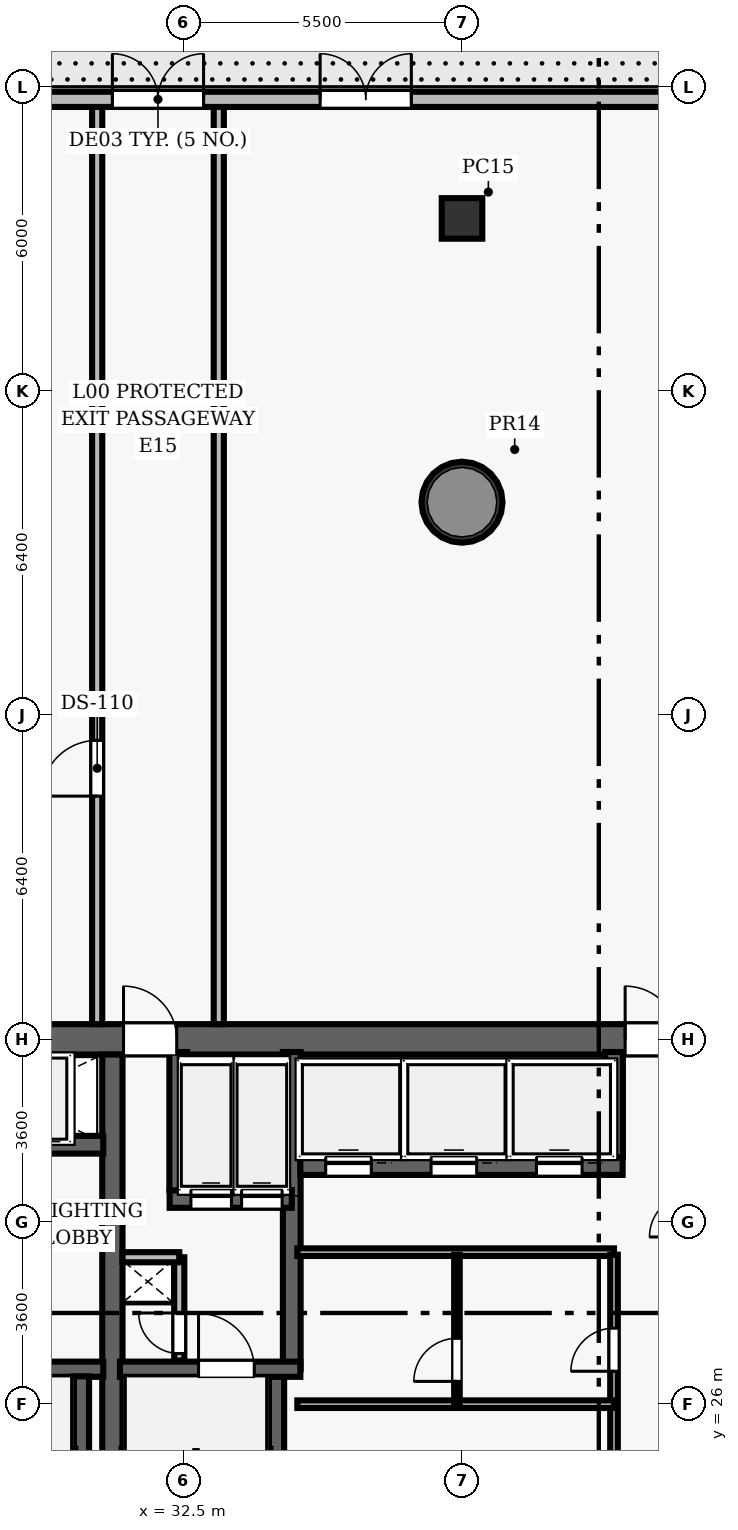
"""IFC4 building model, lengths in metres.
Left out: names, types, materials, properties, quantities, classifications, styles, units other than length and angle.
Written with IfcOpenShell. Run it as: python <this file> out.ifc"""

import sys

from ifc_helpers import new_model, si_unit, direction, frame, frame_2d, origin, origin_2d, place, context, subcontext, project, spatial, rectangle, hollow_circle, extrude, element, fill, save


model = new_model("IFC4")
c1 = context("Model", 3, precision=1e-05, world=origin(), true_north=direction((0.0, 1.0)))
c2 = subcontext(c1, "Body", "Model", "MODEL_VIEW")
j1 = project(units=[si_unit("LENGTHUNIT", "METRE"), si_unit("PLANEANGLEUNIT", "RADIAN")], contexts=[c1])
p1 = place(None, origin())
s1 = spatial("IfcSite", under=j1, at=p1, CompositionType="ELEMENT")
p2 = place(p1, origin())
s2 = spatial("IfcBuilding", under=s1, at=p2, CompositionType="ELEMENT")
p3 = place(p2, origin())
s3 = spatial("IfcBuildingStorey", under=s2, at=p3, CompositionType="ELEMENT", Elevation=0.0)
p4 = place(p3, frame((26.7, 33.2, 0.0), z_axis=(0.0, 0.0, 1.0), x_axis=(1.0, 0.0, 0.0)))
e1 = element("IfcWall", 1, at=p4, inside=s3, PredefinedType="SHEAR", context=c2, shape_type="SweptSolid", body=[
    extrude(rectangle(XDim=22.6, YDim=0.6, at=frame_2d((11.3, 0.0))), origin(), (0.0, 0.0, 1.0), 6.6),
])
p5 = place(p4, frame((4.62, 0.0, 0.0)))
e2 = element("IfcOpeningElement", 2, at=p5, cuts=e1, PredefinedType="OPENING", context=c2, shape_type="SweptSolid", body=[
    extrude(rectangle(XDim=1.05, YDim=2.15, at=frame_2d((0.525, 1.075))), frame((0.0, 0.31, 0.0), z_axis=(0.0, -1.0, 0.0), x_axis=(1.0, 0.0, 0.0)), (0.0, 0.0, 1.0), 0.62),
])
p6 = place(p4, frame((14.52, 0.0, 0.0)))
e3 = element("IfcOpeningElement", 3, at=p6, cuts=e1, PredefinedType="OPENING", context=c2, shape_type="SweptSolid", body=[
    extrude(rectangle(XDim=1.05, YDim=2.15, at=frame_2d((0.525, 1.075))), frame((0.0, 0.31, 0.0), z_axis=(0.0, -1.0, 0.0), x_axis=(1.0, 0.0, 0.0)), (0.0, 0.0, 1.0), 0.62),
])
p7 = place(p3, frame((31.1, 19.1, 0.0), z_axis=(0.0, 0.0, 1.0), x_axis=(0.0, 1.0, 0.0)))
e4 = element("IfcWall", 4, at=p7, inside=s3, PredefinedType="SHEAR", context=c2, shape_type="SweptSolid", body=[
    extrude(rectangle(XDim=13.8, YDim=0.4, at=frame_2d((6.9, 0.0))), origin(), (0.0, 0.0, 1.0), 6.6),
])
p8 = place(p3, frame((38.0, 49.4, 0.0), z_axis=(0.0, 0.0, 1.0), x_axis=(1.0, 0.0, 0.0)))
e5 = element("IfcColumn", 5, at=p8, inside=s3, PredefinedType="COLUMN", context=c2, shape_type="SweptSolid", body=[
    extrude(rectangle(XDim=0.8, YDim=0.8, at=origin_2d()), origin(), (0.0, 0.0, 1.0), 6.6),
])
p9 = place(p3, frame((38.0, 43.8, 0.0), z_axis=(0.0, 0.0, 1.0), x_axis=(1.0, 0.0, 0.0)))
e6 = element("IfcColumn", 6, at=p9, inside=s3, PredefinedType="COLUMN", context=c2, shape_type="SweptSolid", body=[
    extrude(hollow_circle(Radius=0.8, WallThickness=0.06, at=origin_2d()), origin(), (0.0, 0.0, 1.0), 6.6),
])
p10 = place(p3, frame((27.25, 26.69, 0.0), z_axis=(0.0, 0.0, 1.0), x_axis=(1.0, 0.0, 0.0)))
e7 = element("IfcWall", 7, at=p10, inside=s3, PredefinedType="SHEAR", context=c2, shape_type="SweptSolid", body=[
    extrude(rectangle(XDim=3.67, YDim=0.3, at=frame_2d((1.835, 0.0))), origin(), (0.0, 0.0, 1.0), 6.6),
])
p11 = place(p10, frame((1.05, 0.0, 0.0)))
e8 = element("IfcOpeningElement", 8, at=p11, cuts=e7, PredefinedType="OPENING", context=c2, shape_type="SweptSolid", body=[
    extrude(rectangle(XDim=1.1, YDim=2.15, at=frame_2d((0.55, 1.075))), frame((0.0, 0.16, 0.0), z_axis=(0.0, -1.0, 0.0), x_axis=(1.0, 0.0, 0.0)), (0.0, 0.0, 1.0), 0.32),
])
p12 = place(p3, frame((30.49, 19.05, 0.0), z_axis=(0.0, 0.0, 1.0), x_axis=(0.0, 1.0, 0.0)))
e9 = element("IfcWall", 9, at=p12, inside=s3, PredefinedType="SHEAR", context=c2, shape_type="SweptSolid", body=[
    extrude(rectangle(XDim=7.5, YDim=0.3, at=frame_2d((3.75, 0.0))), origin(), (0.0, 0.0, 1.0), 6.6),
])
p13 = place(p3, frame((27.25, 31.12, 0.0), z_axis=(0.0, 0.0, 1.0), x_axis=(1.0, 0.0, 0.0)))
e10 = element("IfcWall", 10, at=p13, inside=s3, PredefinedType="SHEAR", context=c2, shape_type="SweptSolid", body=[
    extrude(rectangle(XDim=3.67, YDim=0.35, at=frame_2d((1.835, 0.0))), origin(), (0.0, 0.0, 1.0), 5.31),
])
p14 = place(p13, frame((1.25, 0.0, 0.0)))
e11 = element("IfcOpeningElement", 11, at=p14, cuts=e10, PredefinedType="OPENING", context=c2, shape_type="SweptSolid", body=[
    extrude(rectangle(XDim=1.1, YDim=2.15, at=frame_2d((0.55, 1.075))), frame((0.0, 0.185, 0.0), z_axis=(0.0, -1.0, 0.0), x_axis=(1.0, 0.0, 0.0)), (0.0, 0.0, 1.0), 0.37),
])
p15 = place(p3, frame((34.34, 19.05, 0.0), z_axis=(0.0, 0.0, 1.0), x_axis=(0.0, 1.0, 0.0)))
e12 = element("IfcWall", 12, at=p15, inside=s3, PredefinedType="SHEAR", context=c2, shape_type="SweptSolid", body=[
    extrude(rectangle(XDim=7.5, YDim=0.3, at=frame_2d((3.75, 0.0))), origin(), (0.0, 0.0, 1.0), 6.6),
])
p16 = place(p3, frame((34.64, 26.69, 0.0), z_axis=(0.0, 0.0, 1.0), x_axis=(0.0, 1.0, 0.0)))
e13 = element("IfcWall", 13, at=p16, inside=s3, PredefinedType="SHEAR", context=c2, shape_type="SweptSolid", body=[
    extrude(rectangle(XDim=6.26, YDim=0.35, at=frame_2d((3.13, 0.0))), origin(), (0.0, 0.0, 1.0), 6.6),
])
p17 = place(p3, frame((31.25, 26.69, 0.0), z_axis=(0.0, 0.0, 1.0), x_axis=(1.0, 0.0, 0.0)))
e14 = element("IfcWall", 14, at=p17, inside=s3, PredefinedType="SHEAR", context=c2, shape_type="SweptSolid", body=[
    extrude(rectangle(XDim=3.56, YDim=0.3, at=frame_2d((1.78, 0.0))), origin(), (0.0, 0.0, 1.0), 6.6),
])
p18 = place(p17, frame((1.55, 0.0, 0.0)))
e15 = element("IfcOpeningElement", 15, at=p18, cuts=e14, PredefinedType="OPENING", context=c2, shape_type="SweptSolid", body=[
    extrude(rectangle(XDim=1.1, YDim=2.15, at=frame_2d((0.55, 1.075))), frame((0.0, 0.16, 0.0), z_axis=(0.0, -1.0, 0.0), x_axis=(1.0, 0.0, 0.0)), (0.0, 0.0, 1.0), 0.32),
])
p19 = place(p3, frame((32.23, 30.05, 0.0), z_axis=(0.0, 0.0, 1.0), x_axis=(1.0, 0.0, 0.0)))
e16 = element("IfcWall", 16, at=p19, inside=s3, PredefinedType="SHEAR", context=c2, shape_type="SweptSolid", body=[
    extrude(rectangle(XDim=2.41, YDim=0.35, at=frame_2d((1.205, 0.0))), origin(), (0.0, 0.0, 1.0), 5.31),
])
p20 = place(p19, frame((0.42, 0.0, 0.0)))
e17 = element("IfcOpeningElement", 17, at=p20, cuts=e16, PredefinedType="OPENING", context=c2, shape_type="SweptSolid", body=[
    extrude(rectangle(XDim=0.8, YDim=2.15, at=frame_2d((0.4, 1.075))), frame((0.0, 0.185, 0.0), z_axis=(0.0, -1.0, 0.0), x_axis=(1.0, 0.0, 0.0)), (0.0, 0.0, 1.0), 0.37),
])
p21 = place(p19, frame((1.42, 0.0, 0.0)))
e18 = element("IfcOpeningElement", 18, at=p21, cuts=e16, PredefinedType="OPENING", context=c2, shape_type="SweptSolid", body=[
    extrude(rectangle(XDim=0.8, YDim=2.15, at=frame_2d((0.4, 1.075))), frame((0.0, 0.185, 0.0), z_axis=(0.0, -1.0, 0.0), x_axis=(1.0, 0.0, 0.0)), (0.0, 0.0, 1.0), 0.37),
])
p22 = place(p3, frame((32.4, 30.22, 0.0), z_axis=(0.0, 0.0, 1.0), x_axis=(0.0, 1.0, 0.0)))
e19 = element("IfcWall", 19, at=p22, inside=s3, PredefinedType="SHEAR", context=c2, shape_type="SweptSolid", body=[
    extrude(rectangle(XDim=2.73, YDim=0.35, at=frame_2d((1.365, 0.0))), origin(), (0.0, 0.0, 1.0), 5.31),
])
p23 = place(p3, frame((32.42, 26.86, 0.0), z_axis=(0.0, 0.0, 1.0), x_axis=(0.0, 1.0, 0.0)))
e20 = element("IfcWall", 20, at=p23, inside=s3, PredefinedType="PARTITIONING", context=c2, shape_type="SweptSolid", body=[
    extrude(rectangle(XDim=2.04, YDim=0.2, at=frame_2d((1.02, 0.0))), origin(), (0.0, 0.0, 1.0), 5.31),
])
p24 = place(p23, frame((0.14, 0.0, 0.0)))
e21 = element("IfcOpeningElement", 21, at=p24, cuts=e20, PredefinedType="OPENING", context=c2, shape_type="SweptSolid", body=[
    extrude(rectangle(XDim=0.8, YDim=2.05, at=frame_2d((0.4, 1.025))), frame((0.0, 0.11, 0.0), z_axis=(0.0, -1.0, 0.0), x_axis=(1.0, 0.0, 0.0)), (0.0, 0.0, 1.0), 0.22),
])
p25 = place(p3, frame((31.3, 28.9, 0.0), z_axis=(0.0, 0.0, 1.0), x_axis=(1.0, 0.0, 0.0)))
e22 = element("IfcWall", 22, at=p25, inside=s3, PredefinedType="PARTITIONING", context=c2, shape_type="SweptSolid", body=[
    extrude(rectangle(XDim=1.12, YDim=0.2, at=frame_2d((0.56, 0.0))), origin(), (0.0, 0.0, 1.0), 5.31),
])
p26 = place(p3, frame((34.81, 30.7, 0.0), z_axis=(0.0, 0.0, 1.0), x_axis=(1.0, 0.0, 0.0)))
e23 = element("IfcWall", 23, at=p26, inside=s3, PredefinedType="SHEAR", context=c2, shape_type="SweptSolid", body=[
    extrude(rectangle(XDim=6.36, YDim=0.35, at=frame_2d((3.18, 0.0))), origin(), (0.0, 0.0, 1.0), 5.31),
])
p27 = place(p26, frame((0.5, 0.0, 0.0)))
e24 = element("IfcOpeningElement", 24, at=p27, cuts=e23, PredefinedType="OPENING", context=c2, shape_type="SweptSolid", body=[
    extrude(rectangle(XDim=0.9, YDim=2.15, at=frame_2d((0.45, 1.075))), frame((0.0, 0.185, 0.0), z_axis=(0.0, -1.0, 0.0), x_axis=(1.0, 0.0, 0.0)), (0.0, 0.0, 1.0), 0.37),
])
p28 = place(p26, frame((2.58, 0.0, 0.0)))
e25 = element("IfcOpeningElement", 25, at=p28, cuts=e23, PredefinedType="OPENING", context=c2, shape_type="SweptSolid", body=[
    extrude(rectangle(XDim=0.9, YDim=2.15, at=frame_2d((0.45, 1.075))), frame((0.0, 0.185, 0.0), z_axis=(0.0, -1.0, 0.0), x_axis=(1.0, 0.0, 0.0)), (0.0, 0.0, 1.0), 0.37),
])
p29 = place(p26, frame((4.66, 0.0, 0.0)))
e26 = element("IfcOpeningElement", 26, at=p29, cuts=e23, PredefinedType="OPENING", context=c2, shape_type="SweptSolid", body=[
    extrude(rectangle(XDim=0.9, YDim=2.15, at=frame_2d((0.45, 1.075))), frame((0.0, 0.185, 0.0), z_axis=(0.0, -1.0, 0.0), x_axis=(1.0, 0.0, 0.0)), (0.0, 0.0, 1.0), 0.37),
])
p30 = place(p3, frame((41.0, 30.87, 0.0), z_axis=(0.0, 0.0, 1.0), x_axis=(0.0, 1.0, 0.0)))
e27 = element("IfcWall", 27, at=p30, inside=s3, PredefinedType="SHEAR", context=c2, shape_type="SweptSolid", body=[
    extrude(rectangle(XDim=2.08, YDim=0.35, at=frame_2d((1.04, 0.0))), origin(), (0.0, 0.0, 1.0), 5.31),
])
p31 = place(p3, frame((34.75, 29.0, 0.0), z_axis=(0.0, 0.0, 1.0), x_axis=(1.0, 0.0, 0.0)))
e28 = element("IfcWall", 28, at=p31, inside=s3, PredefinedType="PARTITIONING", context=c2, shape_type="SweptSolid", body=[
    extrude(rectangle(XDim=6.25, YDim=0.15, at=frame_2d((3.125, 0.0))), origin(), (0.0, 0.0, 1.0), 5.31),
])
p32 = place(p3, frame((41.0, 23.05, 0.0), z_axis=(0.0, 0.0, 1.0), x_axis=(0.0, 1.0, 0.0)))
e29 = element("IfcWall", 29, at=p32, inside=s3, PredefinedType="PARTITIONING", context=c2, shape_type="SweptSolid", body=[
    extrude(rectangle(XDim=5.9, YDim=0.15, at=frame_2d((2.95, 0.0))), origin(), (0.0, 0.0, 1.0), 5.31),
])
p33 = place(p32, frame((0.65, 0.0, 0.0)))
e30 = element("IfcOpeningElement", 30, at=p33, cuts=e29, PredefinedType="OPENING", context=c2, shape_type="SweptSolid", body=[
    extrude(rectangle(XDim=0.85, YDim=2.1, at=frame_2d((0.425, 1.05))), frame((0.0, 0.085, 0.0), z_axis=(0.0, -1.0, 0.0), x_axis=(1.0, 0.0, 0.0)), (0.0, 0.0, 1.0), 0.17),
])
p34 = place(p32, frame((3.6, 0.0, 0.0)))
e31 = element("IfcOpeningElement", 31, at=p34, cuts=e29, PredefinedType="OPENING", context=c2, shape_type="SweptSolid", body=[
    extrude(rectangle(XDim=0.85, YDim=2.1, at=frame_2d((0.425, 1.05))), frame((0.0, 0.085, 0.0), z_axis=(0.0, -1.0, 0.0), x_axis=(1.0, 0.0, 0.0)), (0.0, 0.0, 1.0), 0.17),
])
p35 = place(p3, frame((34.75, 26.0, 0.0), z_axis=(0.0, 0.0, 1.0), x_axis=(1.0, 0.0, 0.0)))
e32 = element("IfcWall", 32, at=p35, inside=s3, PredefinedType="PARTITIONING", context=c2, shape_type="SweptSolid", body=[
    extrude(rectangle(XDim=6.25, YDim=0.15, at=frame_2d((3.125, 0.0))), origin(), (0.0, 0.0, 1.0), 5.31),
])
p36 = place(p3, frame((37.9, 26.0, 0.0), z_axis=(0.0, 0.0, 1.0), x_axis=(0.0, 1.0, 0.0)))
e33 = element("IfcWall", 33, at=p36, inside=s3, PredefinedType="PARTITIONING", context=c2, shape_type="SweptSolid", body=[
    extrude(rectangle(XDim=2.95, YDim=0.11, at=frame_2d((1.475, 0.0))), origin(), (0.0, 0.0, 1.0), 5.31),
])
p37 = place(p36, frame((0.45, 0.0, 0.0)))
e34 = element("IfcOpeningElement", 34, at=p37, cuts=e33, PredefinedType="OPENING", context=c2, shape_type="SweptSolid", body=[
    extrude(rectangle(XDim=0.85, YDim=2.1, at=frame_2d((0.425, 1.05))), frame((0.0, 0.065, 0.0), z_axis=(0.0, -1.0, 0.0), x_axis=(1.0, 0.0, 0.0)), (0.0, 0.0, 1.0), 0.13),
])
p38 = place(p3, frame((30.8, 33.5, 0.0), z_axis=(0.0, 0.0, 1.0), x_axis=(0.0, 1.0, 0.0)))
e35 = element("IfcWall", 35, at=p38, inside=s3, PredefinedType="PARTITIONING", context=c2, shape_type="SweptSolid", body=[
    extrude(rectangle(XDim=18.36, YDim=0.2, at=frame_2d((9.18, 0.0))), origin(), (0.0, 0.0, 1.0), 5.31),
])
p39 = place(p38, frame((4.5, 0.0, 0.0)))
e36 = element("IfcOpeningElement", 36, at=p39, cuts=e35, PredefinedType="OPENING", context=c2, shape_type="SweptSolid", body=[
    extrude(rectangle(XDim=1.1, YDim=2.15, at=frame_2d((0.55, 1.075))), frame((0.0, 0.11, 0.0), z_axis=(0.0, -1.0, 0.0), x_axis=(1.0, 0.0, 0.0)), (0.0, 0.0, 1.0), 0.22),
])
p40 = place(p3, frame((33.2, 33.5, 0.0), z_axis=(0.0, 0.0, 1.0), x_axis=(0.0, 1.0, 0.0)))
e37 = element("IfcWall", 37, at=p40, inside=s3, PredefinedType="PARTITIONING", context=c2, shape_type="SweptSolid", body=[
    extrude(rectangle(XDim=18.36, YDim=0.2, at=frame_2d((9.18, 0.0))), origin(), (0.0, 0.0, 1.0), 5.31),
])
p41 = place(p3, frame((0.4, 51.75, 0.0), z_axis=(0.0, 0.0, 1.0), x_axis=(1.0, 0.0, 0.0)))
e38 = element("IfcWall", 38, at=p41, inside=s3, PredefinedType="SOLIDWALL", context=c2, shape_type="SweptSolid", body=[
    extrude(rectangle(XDim=75.2, YDim=0.3, at=frame_2d((37.6, 0.0))), origin(), (0.0, 0.0, 1.0), 5.76),
])
p42 = place(p41, frame((22.0, 0.0, 1.0)))
e39 = element("IfcOpeningElement", 39, at=p42, cuts=e38, PredefinedType="OPENING", context=c2, shape_type="SweptSolid", body=[
    extrude(rectangle(XDim=2.4, YDim=2.0, at=frame_2d((1.2, 1.0))), frame((0.0, 0.16, 0.0), z_axis=(0.0, -1.0, 0.0), x_axis=(1.0, 0.0, 0.0)), (0.0, 0.0, 1.0), 0.32),
])
p43 = place(p41, frame((42.0, 0.0, 1.0)))
e40 = element("IfcOpeningElement", 40, at=p43, cuts=e38, PredefinedType="OPENING", context=c2, shape_type="SweptSolid", body=[
    extrude(rectangle(XDim=2.4, YDim=2.0, at=frame_2d((1.2, 1.0))), frame((0.0, 0.16, 0.0), z_axis=(0.0, -1.0, 0.0), x_axis=(1.0, 0.0, 0.0)), (0.0, 0.0, 1.0), 0.32),
])
p44 = place(p41, frame((11.6, 0.0, 0.0)))
e41 = element("IfcOpeningElement", 41, at=p44, cuts=e38, PredefinedType="OPENING", context=c2, shape_type="SweptSolid", body=[
    extrude(rectangle(XDim=1.8, YDim=2.3, at=frame_2d((0.9, 1.15))), frame((0.0, 0.16, 0.0), z_axis=(0.0, -1.0, 0.0), x_axis=(1.0, 0.0, 0.0)), (0.0, 0.0, 1.0), 0.32),
])
p45 = place(p41, frame((16.6, 0.0, 0.0)))
e42 = element("IfcOpeningElement", 42, at=p45, cuts=e38, PredefinedType="OPENING", context=c2, shape_type="SweptSolid", body=[
    extrude(rectangle(XDim=1.8, YDim=2.3, at=frame_2d((0.9, 1.15))), frame((0.0, 0.16, 0.0), z_axis=(0.0, -1.0, 0.0), x_axis=(1.0, 0.0, 0.0)), (0.0, 0.0, 1.0), 0.32),
])
p46 = place(p41, frame((30.7, 0.0, 0.0)))
e43 = element("IfcOpeningElement", 43, at=p46, cuts=e38, PredefinedType="OPENING", context=c2, shape_type="SweptSolid", body=[
    extrude(rectangle(XDim=1.8, YDim=2.3, at=frame_2d((0.9, 1.15))), frame((0.0, 0.16, 0.0), z_axis=(0.0, -1.0, 0.0), x_axis=(1.0, 0.0, 0.0)), (0.0, 0.0, 1.0), 0.32),
])
p47 = place(p41, frame((34.8, 0.0, 0.0)))
e44 = element("IfcOpeningElement", 44, at=p47, cuts=e38, PredefinedType="OPENING", context=c2, shape_type="SweptSolid", body=[
    extrude(rectangle(XDim=1.8, YDim=2.3, at=frame_2d((0.9, 1.15))), frame((0.0, 0.16, 0.0), z_axis=(0.0, -1.0, 0.0), x_axis=(1.0, 0.0, 0.0)), (0.0, 0.0, 1.0), 0.32),
])
p48 = place(p41, frame((52.2, 0.0, 0.0)))
e45 = element("IfcOpeningElement", 45, at=p48, cuts=e38, PredefinedType="OPENING", context=c2, shape_type="SweptSolid", body=[
    extrude(rectangle(XDim=1.8, YDim=2.3, at=frame_2d((0.9, 1.15))), frame((0.0, 0.16, 0.0), z_axis=(0.0, -1.0, 0.0), x_axis=(1.0, 0.0, 0.0)), (0.0, 0.0, 1.0), 0.32),
])
p49 = place(p41, frame((64.6, 0.0, 0.0)))
e46 = element("IfcOpeningElement", 46, at=p49, cuts=e38, PredefinedType="OPENING", context=c2, shape_type="SweptSolid", body=[
    extrude(rectangle(XDim=6.6, YDim=3.2, at=frame_2d((3.3, 1.6))), frame((0.0, 0.16, 0.0), z_axis=(0.0, -1.0, 0.0), x_axis=(1.0, 0.0, 0.0)), (0.0, 0.0, 1.0), 0.32),
])
p50 = place(p18, origin())
e47 = element("IfcDoor", 47, at=p50, inside=s3, OperationType="SINGLE_SWING_LEFT", PredefinedType="DOOR", context=c2, shape_type="SweptSolid", body=[
    extrude(rectangle(XDim=1.1, YDim=2.15, at=frame_2d((0.55, 1.075))), frame((0.0, 0.025, 0.0), z_axis=(0.0, -1.0, 0.0), x_axis=(1.0, 0.0, 0.0)), (0.0, 0.0, 1.0), 0.05),
])
fill(e15, e47)
p51 = place(p24, origin())
e48 = element("IfcDoor", 48, at=p51, inside=s3, OperationType="SINGLE_SWING_RIGHT", PredefinedType="DOOR", context=c2, shape_type="SweptSolid", body=[
    extrude(rectangle(XDim=0.8, YDim=2.05, at=frame_2d((0.4, 1.025))), frame((0.0, 0.025, 0.0), z_axis=(0.0, -1.0, 0.0), x_axis=(1.0, 0.0, 0.0)), (0.0, 0.0, 1.0), 0.05),
])
fill(e21, e48)
p52 = place(p5, origin())
e49 = element("IfcDoor", 49, at=p52, inside=s3, OperationType="SINGLE_SWING_LEFT", PredefinedType="DOOR", context=c2, shape_type="SweptSolid", body=[
    extrude(rectangle(XDim=1.05, YDim=2.15, at=frame_2d((0.525, 1.075))), frame((0.0, 0.025, 0.0), z_axis=(0.0, -1.0, 0.0), x_axis=(1.0, 0.0, 0.0)), (0.0, 0.0, 1.0), 0.05),
])
fill(e2, e49)
p53 = place(p6, origin())
e50 = element("IfcDoor", 50, at=p53, inside=s3, OperationType="SINGLE_SWING_LEFT", PredefinedType="DOOR", context=c2, shape_type="SweptSolid", body=[
    extrude(rectangle(XDim=1.05, YDim=2.15, at=frame_2d((0.525, 1.075))), frame((0.0, 0.025, 0.0), z_axis=(0.0, -1.0, 0.0), x_axis=(1.0, 0.0, 0.0)), (0.0, 0.0, 1.0), 0.05),
])
fill(e3, e50)
p54 = place(p34, origin())
e51 = element("IfcDoor", 51, at=p54, inside=s3, OperationType="SINGLE_SWING_LEFT", PredefinedType="DOOR", context=c2, shape_type="SweptSolid", body=[
    extrude(rectangle(XDim=0.85, YDim=2.1, at=frame_2d((0.425, 1.05))), frame((0.0, 0.025, 0.0), z_axis=(0.0, -1.0, 0.0), x_axis=(1.0, 0.0, 0.0)), (0.0, 0.0, 1.0), 0.05),
])
fill(e31, e51)
p55 = place(p37, origin())
e52 = element("IfcDoor", 52, at=p55, inside=s3, OperationType="SINGLE_SWING_LEFT", PredefinedType="DOOR", context=c2, shape_type="SweptSolid", body=[
    extrude(rectangle(XDim=0.85, YDim=2.1, at=frame_2d((0.425, 1.05))), frame((0.0, 0.025, 0.0), z_axis=(0.0, -1.0, 0.0), x_axis=(1.0, 0.0, 0.0)), (0.0, 0.0, 1.0), 0.05),
])
fill(e34, e52)
p56 = place(p39, origin())
e53 = element("IfcDoor", 53, at=p56, inside=s3, OperationType="SINGLE_SWING_LEFT", PredefinedType="DOOR", context=c2, shape_type="SweptSolid", body=[
    extrude(rectangle(XDim=1.1, YDim=2.15, at=frame_2d((0.55, 1.075))), frame((0.0, 0.025, 0.0), z_axis=(0.0, -1.0, 0.0), x_axis=(1.0, 0.0, 0.0)), (0.0, 0.0, 1.0), 0.05),
])
fill(e36, e53)
p57 = place(p27, origin())
e54 = element("IfcDoor", 54, at=p57, inside=s3, OperationType="SLIDING_TO_LEFT", PredefinedType="DOOR", context=c2, shape_type="SweptSolid", body=[
    extrude(rectangle(XDim=0.9, YDim=2.15, at=frame_2d((0.45, 1.075))), frame((0.0, 0.025, 0.0), z_axis=(0.0, -1.0, 0.0), x_axis=(1.0, 0.0, 0.0)), (0.0, 0.0, 1.0), 0.05),
])
fill(e24, e54)
p58 = place(p28, origin())
e55 = element("IfcDoor", 55, at=p58, inside=s3, OperationType="SLIDING_TO_LEFT", PredefinedType="DOOR", context=c2, shape_type="SweptSolid", body=[
    extrude(rectangle(XDim=0.9, YDim=2.15, at=frame_2d((0.45, 1.075))), frame((0.0, 0.025, 0.0), z_axis=(0.0, -1.0, 0.0), x_axis=(1.0, 0.0, 0.0)), (0.0, 0.0, 1.0), 0.05),
])
fill(e25, e55)
p59 = place(p29, origin())
e56 = element("IfcDoor", 56, at=p59, inside=s3, OperationType="SLIDING_TO_LEFT", PredefinedType="DOOR", context=c2, shape_type="SweptSolid", body=[
    extrude(rectangle(XDim=0.9, YDim=2.15, at=frame_2d((0.45, 1.075))), frame((0.0, 0.025, 0.0), z_axis=(0.0, -1.0, 0.0), x_axis=(1.0, 0.0, 0.0)), (0.0, 0.0, 1.0), 0.05),
])
fill(e26, e56)
p60 = place(p20, origin())
e57 = element("IfcDoor", 57, at=p60, inside=s3, OperationType="SLIDING_TO_LEFT", PredefinedType="DOOR", context=c2, shape_type="SweptSolid", body=[
    extrude(rectangle(XDim=0.8, YDim=2.15, at=frame_2d((0.4, 1.075))), frame((0.0, 0.025, 0.0), z_axis=(0.0, -1.0, 0.0), x_axis=(1.0, 0.0, 0.0)), (0.0, 0.0, 1.0), 0.05),
])
fill(e17, e57)
p61 = place(p21, origin())
e58 = element("IfcDoor", 58, at=p61, inside=s3, OperationType="SLIDING_TO_LEFT", PredefinedType="DOOR", context=c2, shape_type="SweptSolid", body=[
    extrude(rectangle(XDim=0.8, YDim=2.15, at=frame_2d((0.4, 1.075))), frame((0.0, 0.025, 0.0), z_axis=(0.0, -1.0, 0.0), x_axis=(1.0, 0.0, 0.0)), (0.0, 0.0, 1.0), 0.05),
])
fill(e18, e58)
p62 = place(p46, origin())
e59 = element("IfcDoor", 59, at=p62, inside=s3, OperationType="DOUBLE_DOOR_SINGLE_SWING", PredefinedType="DOOR", context=c2, shape_type="SweptSolid", body=[
    extrude(rectangle(XDim=1.8, YDim=2.3, at=frame_2d((0.9, 1.15))), frame((0.0, 0.025, 0.0), z_axis=(0.0, -1.0, 0.0), x_axis=(1.0, 0.0, 0.0)), (0.0, 0.0, 1.0), 0.05),
])
fill(e43, e59)
p63 = place(p47, origin())
e60 = element("IfcDoor", 60, at=p63, inside=s3, OperationType="DOUBLE_DOOR_SINGLE_SWING", PredefinedType="DOOR", context=c2, shape_type="SweptSolid", body=[
    extrude(rectangle(XDim=1.8, YDim=2.3, at=frame_2d((0.9, 1.15))), frame((0.0, 0.025, 0.0), z_axis=(0.0, -1.0, 0.0), x_axis=(1.0, 0.0, 0.0)), (0.0, 0.0, 1.0), 0.05),
])
fill(e44, e60)
save(model, sys.argv[1])
